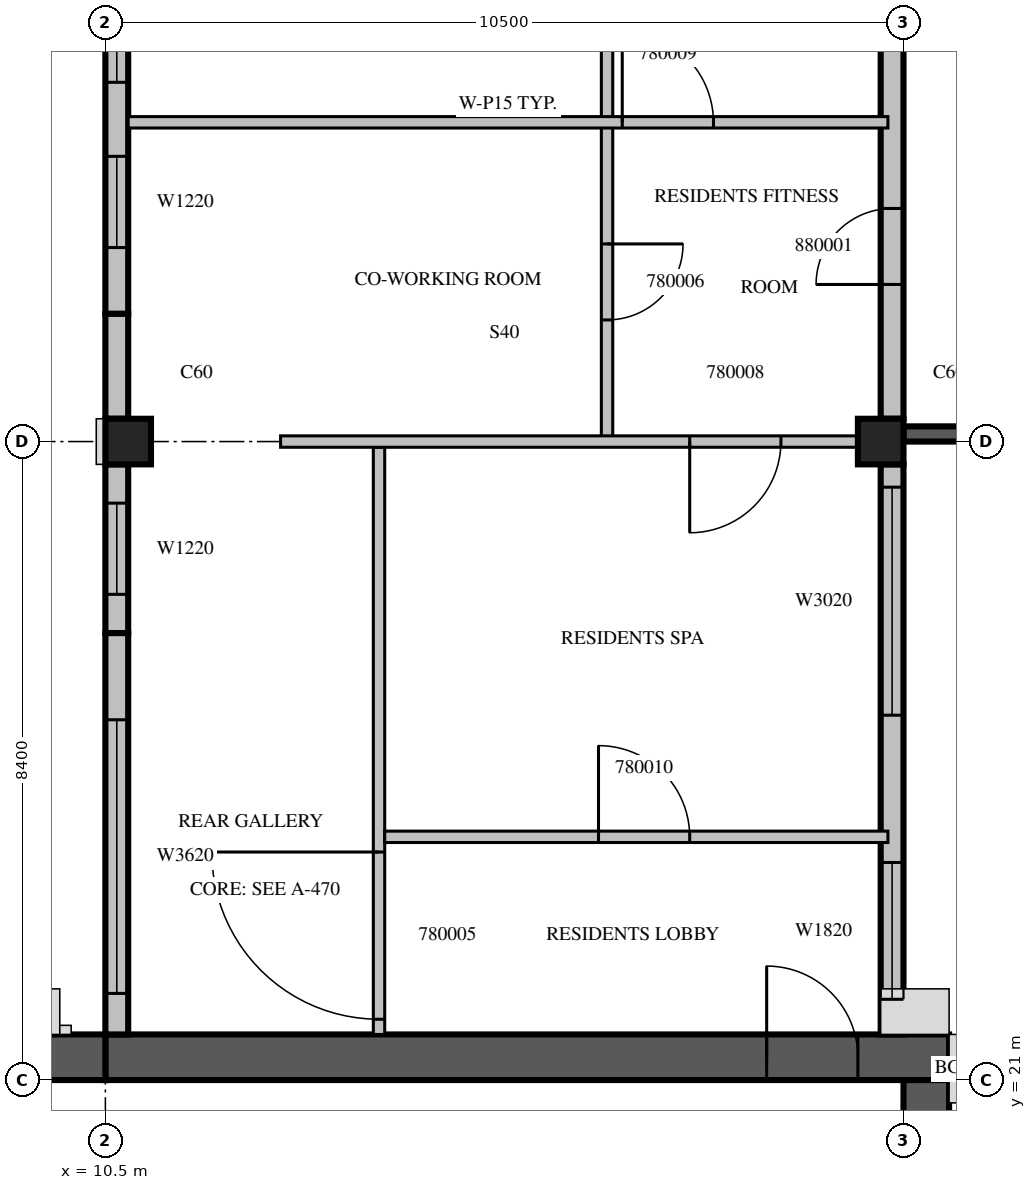
"""IFC4 building model, lengths in metres.
Left out: names, types, materials, properties, quantities, classifications, styles, units other than length and angle.
Written with IfcOpenShell. Run it as: python <this file> out.ifc"""

import sys

from ifc_helpers import new_model, si_unit, direction, frame, frame_2d, origin, origin_2d, place, context, subcontext, project, spatial, rectangle, extrude, source, transform, mapped, element, fill, save


model = new_model("IFC4")
c1 = context("Model", 3, precision=1e-05, world=origin(), true_north=direction((0.0, 1.0)))
c2 = subcontext(c1, "Body", "Model", "MODEL_VIEW")
j1 = project(units=[si_unit("LENGTHUNIT", "METRE"), si_unit("PLANEANGLEUNIT", "RADIAN")], contexts=[c1])
p1 = place(None, origin())
s1 = spatial("IfcSite", under=j1, at=p1, CompositionType="ELEMENT")
p2 = place(p1, origin())
s2 = spatial("IfcBuilding", under=s1, at=p2, CompositionType="ELEMENT")
p3 = place(p2, frame((0.0, 0.0, 340.5)))
s3 = spatial("IfcBuildingStorey", under=s2, at=p3, CompositionType="ELEMENT", Elevation=340.5)
m1 = source(origin(), c2, "Body", "SweptSolid", [
    extrude(rectangle(XDim=0.6, YDim=0.6, at=origin_2d()), origin(), (0.0, 0.0, 1.0), 3.5),
])
for number, where, z_axis, x_axis in (
    (1, (10.8, 29.4, 0.0), (0.0, 0.0, 1.0), (1.0, 0.0, 0.0)),
    (2, (20.7, 29.4, 0.0), (0.0, 0.0, 1.0), (1.0, 0.0, 0.0)),
):
    element("IfcColumn", number, at=place(p3, frame(where, z_axis=z_axis, x_axis=x_axis)), inside=s3, PredefinedType="COLUMN", context=c2, shape_type="MappedRepresentation", body=[
        mapped(m1, transform((0.0, 0.0, 0.0), scale=1.0)),
    ])
m2 = source(origin(), c2, "Body", "SweptSolid", [
    extrude(rectangle(XDim=11.1, YDim=0.6, at=frame_2d((5.55, 0.0))), origin(), (0.0, 0.0, 1.0), 3.5),
])
p4 = place(p3, frame((10.5, 21.3, 0.0), z_axis=(0.0, 0.0, 1.0), x_axis=(1.0, 0.0, 0.0)))
e3 = element("IfcWall", 3, at=p4, inside=s3, PredefinedType="SHEAR", context=c2, shape_type="MappedRepresentation", body=[
    mapped(m2, transform((0.0, 0.0, 0.0), scale=1.0)),
])
m3 = source(origin(), c2, "Body", "SweptSolid", [
    extrude(rectangle(XDim=1.2, YDim=2.1, at=frame_2d((0.6, 1.05))), frame((0.0, 0.31, 0.0), z_axis=(0.0, -1.0, 0.0), x_axis=(1.0, 0.0, 0.0)), (0.0, 0.0, 1.0), 0.62),
])
p5 = place(p4, frame((8.7, 0.0, 0.0)))
e4 = element("IfcOpeningElement", 4, at=p5, cuts=e3, PredefinedType="OPENING", context=c2, shape_type="MappedRepresentation", body=[
    mapped(m3, transform((0.0, 0.0, 0.0), scale=1.0)),
])
m4 = source(origin(), c2, "Body", "SweptSolid", [
    extrude(rectangle(XDim=16.8, YDim=0.6, at=frame_2d((8.4, 0.0))), origin(), (0.0, 0.0, 1.0), 3.5),
])
p6 = place(p3, frame((21.3, 4.2, 0.0), z_axis=(0.0, 0.0, 1.0), x_axis=(0.0, 1.0, 0.0)))
e5 = element("IfcWall", 5, at=p6, inside=s3, PredefinedType="SHEAR", context=c2, shape_type="MappedRepresentation", body=[
    mapped(m4, transform((0.0, 0.0, 0.0), scale=1.0)),
])
m5 = source(origin(), c2, "Body", "SweptSolid", [
    extrude(rectangle(XDim=1.2, YDim=2.4, at=frame_2d((0.6, 1.2))), frame((0.0, 0.31, 0.0), z_axis=(0.0, -1.0, 0.0), x_axis=(1.0, 0.0, 0.0)), (0.0, 0.0, 1.0), 0.62),
])
p7 = place(p6, frame((12.0, 0.0, 0.6)))
e6 = element("IfcOpeningElement", 6, at=p7, cuts=e5, PredefinedType="OPENING", context=c2, shape_type="MappedRepresentation", body=[
    mapped(m5, transform((0.0, 0.0, 0.0), scale=1.0)),
])
m6 = source(origin(), c2, "Body", "SweptSolid", [
    extrude(rectangle(XDim=6.6, YDim=0.6, at=frame_2d((3.3, 0.0))), origin(), (0.0, 0.0, 1.0), 3.5),
])
p8 = place(p3, frame((3.9, 21.3, 0.0), z_axis=(0.0, 0.0, 1.0), x_axis=(1.0, 0.0, 0.0)))
e7 = element("IfcWall", 7, at=p8, inside=s3, PredefinedType="SHEAR", context=c2, shape_type="MappedRepresentation", body=[
    mapped(m6, transform((0.0, 0.0, 0.0), scale=1.0)),
])
p9 = place(p8, frame((1.5, 0.0, 0.6)))
e8 = element("IfcOpeningElement", 8, at=p9, cuts=e7, PredefinedType="OPENING", context=c2, shape_type="MappedRepresentation", body=[
    mapped(m5, transform((0.0, 0.0, 0.0), scale=1.0)),
])
p10 = place(p8, frame((3.6, 0.0, 0.6)))
e9 = element("IfcOpeningElement", 9, at=p10, cuts=e7, PredefinedType="OPENING", context=c2, shape_type="MappedRepresentation", body=[
    mapped(m5, transform((0.0, 0.0, 0.0), scale=1.0)),
])
m7 = source(origin(), c2, "Body", "SweptSolid", [
    extrude(rectangle(XDim=7.5, YDim=0.3, at=frame_2d((3.75, 0.0))), origin(), (0.0, 0.0, 1.0), 3.1),
])
p11 = place(p3, frame((20.85, 21.6, 0.0), z_axis=(0.0, 0.0, 1.0), x_axis=(0.0, 1.0, 0.0)))
e10 = element("IfcWall", 10, at=p11, inside=s3, PredefinedType="STANDARD", context=c2, shape_type="MappedRepresentation", body=[
    mapped(m7, transform((0.0, 0.0, 0.0), scale=1.0)),
])
m8 = source(origin(), c2, "Body", "SweptSolid", [
    extrude(rectangle(XDim=1.8, YDim=2.0, at=frame_2d((0.9, 1.0))), frame((0.0, 0.16, 0.0), z_axis=(0.0, -1.0, 0.0), x_axis=(1.0, 0.0, 0.0)), (0.0, 0.0, 1.0), 0.32),
])
p12 = place(p11, frame((0.463, 0.0, 0.6)))
e11 = element("IfcOpeningElement", 11, at=p12, cuts=e10, PredefinedType="OPENING", context=c2, shape_type="MappedRepresentation", body=[
    mapped(m8, transform((0.0, 0.0, 0.0), scale=1.0)),
])
m9 = source(origin(), c2, "Body", "SweptSolid", [
    extrude(rectangle(XDim=3.0, YDim=2.0, at=frame_2d((1.5, 1.0))), frame((0.0, 0.16, 0.0), z_axis=(0.0, -1.0, 0.0), x_axis=(1.0, 0.0, 0.0)), (0.0, 0.0, 1.0), 0.32),
])
p13 = place(p11, frame((4.2, 0.0, 0.6)))
e12 = element("IfcOpeningElement", 12, at=p13, cuts=e10, PredefinedType="OPENING", context=c2, shape_type="MappedRepresentation", body=[
    mapped(m9, transform((0.0, 0.0, 0.0), scale=1.0)),
])
m10 = source(origin(), c2, "Body", "SweptSolid", [
    extrude(rectangle(XDim=7.8, YDim=0.3, at=frame_2d((3.9, 0.0))), origin(), (0.0, 0.0, 1.0), 3.1),
])
p14 = place(p3, frame((20.85, 29.7, 0.0), z_axis=(0.0, 0.0, 1.0), x_axis=(0.0, 1.0, 0.0)))
e13 = element("IfcWall", 13, at=p14, inside=s3, PredefinedType="STANDARD", context=c2, shape_type="MappedRepresentation", body=[
    mapped(m10, transform((0.0, 0.0, 0.0), scale=1.0)),
])
m11 = source(origin(), c2, "Body", "SweptSolid", [
    extrude(rectangle(XDim=1.0, YDim=2.1, at=frame_2d((0.5, 1.05))), frame((0.0, 0.16, 0.0), z_axis=(0.0, -1.0, 0.0), x_axis=(1.0, 0.0, 0.0)), (0.0, 0.0, 1.0), 0.32),
])
p15 = place(p14, frame((1.767, 0.0, 0.0)))
e14 = element("IfcOpeningElement", 14, at=p15, cuts=e13, PredefinedType="OPENING", context=c2, shape_type="MappedRepresentation", body=[
    mapped(m11, transform((0.0, 0.0, 0.0), scale=1.0)),
])
p16 = place(p3, frame((10.65, 37.5, 0.0), z_axis=(0.0, 0.0, 1.0), x_axis=(0.0, -1.0, 0.0)))
e15 = element("IfcWall", 15, at=p16, inside=s3, PredefinedType="STANDARD", context=c2, shape_type="SweptSolid", body=[
    extrude(rectangle(XDim=6.42, YDim=0.3, at=frame_2d((3.21, 0.0))), origin(), (0.0, 0.0, 1.0), 3.1),
])
m12 = source(origin(), c2, "Body", "SweptSolid", [
    extrude(rectangle(XDim=1.2, YDim=2.0, at=frame_2d((0.6, 1.0))), frame((0.0, 0.16, 0.0), z_axis=(0.0, -1.0, 0.0), x_axis=(1.0, 0.0, 0.0)), (0.0, 0.0, 1.0), 0.32),
])
p17 = place(p16, frame((4.348, 0.0, 0.6)))
e16 = element("IfcOpeningElement", 16, at=p17, cuts=e15, PredefinedType="OPENING", context=c2, shape_type="MappedRepresentation", body=[
    mapped(m12, transform((0.0, 0.0, 0.0), scale=1.0)),
])
m13 = source(origin(), c2, "Body", "SweptSolid", [
    extrude(rectangle(XDim=2.4, YDim=2.0, at=frame_2d((1.2, 1.0))), frame((0.0, 0.16, 0.0), z_axis=(0.0, -1.0, 0.0), x_axis=(1.0, 0.0, 0.0)), (0.0, 0.0, 1.0), 0.32),
])
p18 = place(p16, frame((0.974, 0.0, 0.6)))
e17 = element("IfcOpeningElement", 17, at=p18, cuts=e15, PredefinedType="OPENING", context=c2, shape_type="MappedRepresentation", body=[
    mapped(m13, transform((0.0, 0.0, 0.0), scale=1.0)),
])
p19 = place(p3, frame((10.65, 31.08, 0.0), z_axis=(0.0, 0.0, 1.0), x_axis=(0.0, -1.0, 0.0)))
e18 = element("IfcWall", 18, at=p19, inside=s3, PredefinedType="STANDARD", context=c2, shape_type="SweptSolid", body=[
    extrude(rectangle(XDim=1.38, YDim=0.3, at=frame_2d((0.69, 0.0))), origin(), (0.0, 0.0, 1.0), 3.1),
])
p20 = place(p3, frame((10.65, 29.1, 0.0), z_axis=(0.0, 0.0, 1.0), x_axis=(0.0, -1.0, 0.0)))
e19 = element("IfcWall", 19, at=p20, inside=s3, PredefinedType="STANDARD", context=c2, shape_type="SweptSolid", body=[
    extrude(rectangle(XDim=2.22, YDim=0.3, at=frame_2d((1.11, 0.0))), origin(), (0.0, 0.0, 1.0), 3.1),
])
p21 = place(p20, frame((0.51, 0.0, 0.6)))
e20 = element("IfcOpeningElement", 20, at=p21, cuts=e19, PredefinedType="OPENING", context=c2, shape_type="MappedRepresentation", body=[
    mapped(m12, transform((0.0, 0.0, 0.0), scale=1.0)),
])
m14 = source(origin(), c2, "Body", "SweptSolid", [
    extrude(rectangle(XDim=5.28, YDim=0.3, at=frame_2d((2.64, 0.0))), origin(), (0.0, 0.0, 1.0), 3.1),
])
p22 = place(p3, frame((10.65, 26.88, 0.0), z_axis=(0.0, 0.0, 1.0), x_axis=(0.0, -1.0, 0.0)))
e21 = element("IfcWall", 21, at=p22, inside=s3, PredefinedType="STANDARD", context=c2, shape_type="MappedRepresentation", body=[
    mapped(m14, transform((0.0, 0.0, 0.0), scale=1.0)),
])
m15 = source(origin(), c2, "Body", "SweptSolid", [
    extrude(rectangle(XDim=3.6, YDim=2.0, at=frame_2d((1.8, 1.0))), frame((0.0, 0.16, 0.0), z_axis=(0.0, -1.0, 0.0), x_axis=(1.0, 0.0, 0.0)), (0.0, 0.0, 1.0), 0.32),
])
p23 = place(p22, frame((1.14, 0.0, 0.6)))
e22 = element("IfcOpeningElement", 22, at=p23, cuts=e21, PredefinedType="OPENING", context=c2, shape_type="MappedRepresentation", body=[
    mapped(m15, transform((0.0, 0.0, 0.0), scale=1.0)),
])
m16 = source(origin(), c2, "Body", "SweptSolid", [
    extrude(rectangle(XDim=3.9, YDim=0.2, at=frame_2d((1.95, 0.0))), origin(), (0.0, 0.0, 1.0), 3.09),
])
p24 = place(p3, frame((21.0, 29.5, 0.0), z_axis=(0.0, 0.0, 1.0), x_axis=(1.0, 0.0, 0.0)))
e23 = element("IfcWall", 23, at=p24, inside=s3, PredefinedType="SOLIDWALL", context=c2, shape_type="MappedRepresentation", body=[
    mapped(m16, transform((0.0, 0.0, 0.0), scale=1.0)),
])
m17 = source(origin(), c2, "Body", "SweptSolid", [
    extrude(rectangle(XDim=2.4, YDim=2.0, at=frame_2d((1.2, 1.0))), frame((0.0, 0.11, 0.0), z_axis=(0.0, -1.0, 0.0), x_axis=(1.0, 0.0, 0.0)), (0.0, 0.0, 1.0), 0.22),
])
p25 = place(p24, frame((0.75, 0.0, 0.6)))
e24 = element("IfcOpeningElement", 24, at=p25, cuts=e23, PredefinedType="OPENING", context=c2, shape_type="MappedRepresentation", body=[
    mapped(m17, transform((0.0, 0.0, 0.0), scale=1.0)),
])
m18 = source(origin(), c2, "Body", "SweptSolid", [
    extrude(rectangle(XDim=7.725, YDim=0.15, at=frame_2d((3.862, 0.0))), origin(), (0.0, 0.0, 1.0), 3.1),
])
p26 = place(p3, frame((14.1, 29.325, 0.0), z_axis=(0.0, 0.0, 1.0), x_axis=(0.0, -1.0, 0.0)))
e25 = element("IfcWall", 25, at=p26, inside=s3, PredefinedType="PARTITIONING", context=c2, shape_type="MappedRepresentation", body=[
    mapped(m18, transform((0.0, 0.0, 0.0), scale=1.0)),
])
m19 = source(origin(), c2, "Body", "SweptSolid", [
    extrude(rectangle(XDim=2.2, YDim=2.1, at=frame_2d((1.1, 1.05))), frame((0.0, 0.085, 0.0), z_axis=(0.0, -1.0, 0.0), x_axis=(1.0, 0.0, 0.0)), (0.0, 0.0, 1.0), 0.17),
])
p27 = place(p26, frame((5.325, 0.0, 0.0)))
e26 = element("IfcOpeningElement", 26, at=p27, cuts=e25, PredefinedType="OPENING", context=c2, shape_type="MappedRepresentation", body=[
    mapped(m19, transform((0.0, 0.0, 0.0), scale=1.0)),
])
m20 = source(origin(), c2, "Body", "SweptSolid", [
    extrude(rectangle(XDim=6.62, YDim=0.15, at=frame_2d((3.31, 0.0))), origin(), (0.0, 0.0, 1.0), 3.1),
])
p28 = place(p3, frame((14.175, 24.2, 0.0), z_axis=(0.0, 0.0, 1.0), x_axis=(1.0, 0.0, 0.0)))
e27 = element("IfcWall", 27, at=p28, inside=s3, PredefinedType="PARTITIONING", context=c2, shape_type="MappedRepresentation", body=[
    mapped(m20, transform((0.0, 0.0, 0.0), scale=1.0)),
])
m21 = source(origin(), c2, "Body", "SweptSolid", [
    extrude(rectangle(XDim=1.2, YDim=2.1, at=frame_2d((0.6, 1.05))), frame((0.0, 0.085, 0.0), z_axis=(0.0, -1.0, 0.0), x_axis=(1.0, 0.0, 0.0)), (0.0, 0.0, 1.0), 0.17),
])
p29 = place(p28, frame((2.812, 0.0, 0.0)))
e28 = element("IfcOpeningElement", 28, at=p29, cuts=e27, PredefinedType="OPENING", context=c2, shape_type="MappedRepresentation", body=[
    mapped(m21, transform((0.0, 0.0, 0.0), scale=1.0)),
])
m22 = source(origin(), c2, "Body", "SweptSolid", [
    extrude(rectangle(XDim=4.2, YDim=0.15, at=frame_2d((2.1, 0.0))), origin(), (0.0, 0.0, 1.0), 3.1),
])
p30 = place(p3, frame((17.1, 33.6, 0.0), z_axis=(0.0, 0.0, 1.0), x_axis=(0.0, -1.0, 0.0)))
e29 = element("IfcWall", 29, at=p30, inside=s3, PredefinedType="PARTITIONING", context=c2, shape_type="MappedRepresentation", body=[
    mapped(m22, transform((0.0, 0.0, 0.0), scale=1.0)),
])
m23 = source(origin(), c2, "Body", "SweptSolid", [
    extrude(rectangle(XDim=1.0, YDim=2.1, at=frame_2d((0.5, 1.05))), frame((0.0, 0.085, 0.0), z_axis=(0.0, -1.0, 0.0), x_axis=(1.0, 0.0, 0.0)), (0.0, 0.0, 1.0), 0.17),
])
p31 = place(p30, frame((1.6, 0.0, 0.0)))
e30 = element("IfcOpeningElement", 30, at=p31, cuts=e29, PredefinedType="OPENING", context=c2, shape_type="MappedRepresentation", body=[
    mapped(m23, transform((0.0, 0.0, 0.0), scale=1.0)),
])
m24 = source(origin(), c2, "Body", "SweptSolid", [
    extrude(rectangle(XDim=4.105, YDim=0.15, at=frame_2d((2.053, 0.0))), origin(), (0.0, 0.0, 1.0), 3.1),
])
p32 = place(p3, frame((17.1, 37.725, 0.0), z_axis=(0.0, 0.0, 1.0), x_axis=(0.0, -1.0, 0.0)))
e31 = element("IfcWall", 31, at=p32, inside=s3, PredefinedType="PARTITIONING", context=c2, shape_type="MappedRepresentation", body=[
    mapped(m24, transform((0.0, 0.0, 0.0), scale=1.0)),
])
p33 = place(p32, frame((1.525, 0.0, 0.0)))
e32 = element("IfcOpeningElement", 32, at=p33, cuts=e31, PredefinedType="OPENING", context=c2, shape_type="MappedRepresentation", body=[
    mapped(m23, transform((0.0, 0.0, 0.0), scale=1.0)),
])
p34 = place(p3, frame((12.805, 29.4, 0.0), z_axis=(0.0, 0.0, 1.0), x_axis=(1.0, 0.0, 0.0)))
e33 = element("IfcWall", 33, at=p34, inside=s3, PredefinedType="PARTITIONING", context=c2, shape_type="SweptSolid", body=[
    extrude(rectangle(XDim=7.596, YDim=0.15, at=frame_2d((3.798, 0.0))), origin(), (0.0, 0.0, 1.0), 3.1),
])
p35 = place(p34, frame((5.383, 0.0, 0.0)))
e34 = element("IfcOpeningElement", 34, at=p35, cuts=e33, PredefinedType="OPENING", context=c2, shape_type="MappedRepresentation", body=[
    mapped(m21, transform((0.0, 0.0, 0.0), scale=1.0)),
])
m25 = source(origin(), c2, "Body", "SweptSolid", [
    extrude(rectangle(XDim=9.995, YDim=0.15, at=frame_2d((4.997, 0.0))), origin(), (0.0, 0.0, 1.0), 3.1),
])
p36 = place(p3, frame((10.8, 33.6, 0.0), z_axis=(0.0, 0.0, 1.0), x_axis=(1.0, 0.0, 0.0)))
e35 = element("IfcWall", 35, at=p36, inside=s3, PredefinedType="PARTITIONING", context=c2, shape_type="MappedRepresentation", body=[
    mapped(m25, transform((0.0, 0.0, 0.0), scale=1.0)),
])
p37 = place(p36, frame((6.5, 0.0, 0.0)))
e36 = element("IfcOpeningElement", 36, at=p37, cuts=e35, PredefinedType="OPENING", context=c2, shape_type="MappedRepresentation", body=[
    mapped(m21, transform((0.0, 0.0, 0.0), scale=1.0)),
])
m26 = source(origin(), c2, "Body", "SweptSolid", [
    extrude(rectangle(XDim=1.8, YDim=2.0, at=frame_2d((0.9, 1.0))), frame((0.0, 0.03, 0.0), z_axis=(0.0, -1.0, 0.0), x_axis=(1.0, 0.0, 0.0)), (0.0, 0.0, 1.0), 0.06),
])
p38 = place(p12, origin())
e37 = element("IfcWindow", 37, at=p38, inside=s3, PartitioningType="SINGLE_PANEL", PredefinedType="WINDOW", context=c2, shape_type="MappedRepresentation", body=[
    mapped(m26, transform((0.0, 0.0, 0.0), scale=1.0)),
])
fill(e11, e37)
m27 = source(origin(), c2, "Body", "SweptSolid", [
    extrude(rectangle(XDim=3.0, YDim=2.0, at=frame_2d((1.5, 1.0))), frame((0.0, 0.03, 0.0), z_axis=(0.0, -1.0, 0.0), x_axis=(1.0, 0.0, 0.0)), (0.0, 0.0, 1.0), 0.06),
])
p39 = place(p13, origin())
e38 = element("IfcWindow", 38, at=p39, inside=s3, PartitioningType="SINGLE_PANEL", PredefinedType="WINDOW", context=c2, shape_type="MappedRepresentation", body=[
    mapped(m27, transform((0.0, 0.0, 0.0), scale=1.0)),
])
fill(e12, e38)
m28 = source(origin(), c2, "Body", "SweptSolid", [
    extrude(rectangle(XDim=1.2, YDim=2.0, at=frame_2d((0.6, 1.0))), frame((0.0, 0.03, 0.0), z_axis=(0.0, -1.0, 0.0), x_axis=(1.0, 0.0, 0.0)), (0.0, 0.0, 1.0), 0.06),
])
p40 = place(p17, origin())
e39 = element("IfcWindow", 39, at=p40, inside=s3, PartitioningType="SINGLE_PANEL", PredefinedType="WINDOW", context=c2, shape_type="MappedRepresentation", body=[
    mapped(m28, transform((0.0, 0.0, 0.0), scale=1.0)),
])
fill(e16, e39)
m29 = source(origin(), c2, "Body", "SweptSolid", [
    extrude(rectangle(XDim=2.4, YDim=2.0, at=frame_2d((1.2, 1.0))), frame((0.0, 0.03, 0.0), z_axis=(0.0, -1.0, 0.0), x_axis=(1.0, 0.0, 0.0)), (0.0, 0.0, 1.0), 0.06),
])
p41 = place(p18, origin())
e40 = element("IfcWindow", 40, at=p41, inside=s3, PartitioningType="SINGLE_PANEL", PredefinedType="WINDOW", context=c2, shape_type="MappedRepresentation", body=[
    mapped(m29, transform((0.0, 0.0, 0.0), scale=1.0)),
])
fill(e17, e40)
p42 = place(p21, origin())
e41 = element("IfcWindow", 41, at=p42, inside=s3, PartitioningType="SINGLE_PANEL", PredefinedType="WINDOW", context=c2, shape_type="MappedRepresentation", body=[
    mapped(m28, transform((0.0, 0.0, 0.0), scale=1.0)),
])
fill(e20, e41)
m30 = source(origin(), c2, "Body", "SweptSolid", [
    extrude(rectangle(XDim=3.6, YDim=2.0, at=frame_2d((1.8, 1.0))), frame((0.0, 0.03, 0.0), z_axis=(0.0, -1.0, 0.0), x_axis=(1.0, 0.0, 0.0)), (0.0, 0.0, 1.0), 0.06),
])
p43 = place(p23, origin())
e42 = element("IfcWindow", 42, at=p43, inside=s3, PartitioningType="SINGLE_PANEL", PredefinedType="WINDOW", context=c2, shape_type="MappedRepresentation", body=[
    mapped(m30, transform((0.0, 0.0, 0.0), scale=1.0)),
])
fill(e22, e42)
m31 = source(origin(), c2, "Body", "SweptSolid", [
    extrude(rectangle(XDim=1.2, YDim=2.1, at=frame_2d((0.6, 1.05))), frame((0.0, 0.025, 0.0), z_axis=(0.0, -1.0, 0.0), x_axis=(1.0, 0.0, 0.0)), (0.0, 0.0, 1.0), 0.05),
])
p44 = place(p5, origin())
e43 = element("IfcDoor", 43, at=p44, inside=s3, OperationType="SINGLE_SWING_LEFT", PredefinedType="DOOR", context=c2, shape_type="MappedRepresentation", body=[
    mapped(m31, transform((0.0, 0.0, 0.0), scale=1.0)),
])
fill(e4, e43)
m32 = source(origin(), c2, "Body", "SweptSolid", [
    extrude(rectangle(XDim=2.2, YDim=2.1, at=frame_2d((1.1, 1.05))), frame((0.0, 0.025, 0.0), z_axis=(0.0, -1.0, 0.0), x_axis=(1.0, 0.0, 0.0)), (0.0, 0.0, 1.0), 0.05),
])
p45 = place(p27, origin())
e44 = element("IfcDoor", 44, at=p45, inside=s3, OperationType="DOUBLE_DOOR_SINGLE_SWING", PredefinedType="DOOR", context=c2, shape_type="MappedRepresentation", body=[
    mapped(m32, transform((0.0, 0.0, 0.0), scale=1.0)),
])
fill(e26, e44)
m33 = source(origin(), c2, "Body", "SweptSolid", [
    extrude(rectangle(XDim=1.0, YDim=2.1, at=frame_2d((0.5, 1.05))), frame((0.0, 0.025, 0.0), z_axis=(0.0, -1.0, 0.0), x_axis=(1.0, 0.0, 0.0)), (0.0, 0.0, 1.0), 0.05),
])
p46 = place(p31, origin())
e45 = element("IfcDoor", 45, at=p46, inside=s3, OperationType="SINGLE_SWING_LEFT", PredefinedType="DOOR", context=c2, shape_type="MappedRepresentation", body=[
    mapped(m33, transform((0.0, 0.0, 0.0), scale=1.0)),
])
fill(e30, e45)
p47 = place(p35, origin())
e46 = element("IfcDoor", 46, at=p47, inside=s3, OperationType="SINGLE_SWING_RIGHT", PredefinedType="DOOR", context=c2, shape_type="MappedRepresentation", body=[
    mapped(m31, transform((0.0, 0.0, 0.0), scale=1.0)),
])
fill(e34, e46)
p48 = place(p37, origin())
e47 = element("IfcDoor", 47, at=p48, inside=s3, OperationType="SINGLE_SWING_LEFT", PredefinedType="DOOR", context=c2, shape_type="MappedRepresentation", body=[
    mapped(m31, transform((0.0, 0.0, 0.0), scale=1.0)),
])
fill(e36, e47)
p49 = place(p29, origin())
e48 = element("IfcDoor", 48, at=p49, inside=s3, OperationType="SINGLE_SWING_LEFT", PredefinedType="DOOR", context=c2, shape_type="MappedRepresentation", body=[
    mapped(m31, transform((0.0, 0.0, 0.0), scale=1.0)),
])
fill(e28, e48)
p50 = place(p15, origin())
e49 = element("IfcDoor", 49, at=p50, inside=s3, OperationType="SINGLE_SWING_LEFT", PredefinedType="DOOR", context=c2, shape_type="MappedRepresentation", body=[
    mapped(m33, transform((0.0, 0.0, 0.0), scale=1.0)),
])
fill(e14, e49)
save(model, sys.argv[1])
